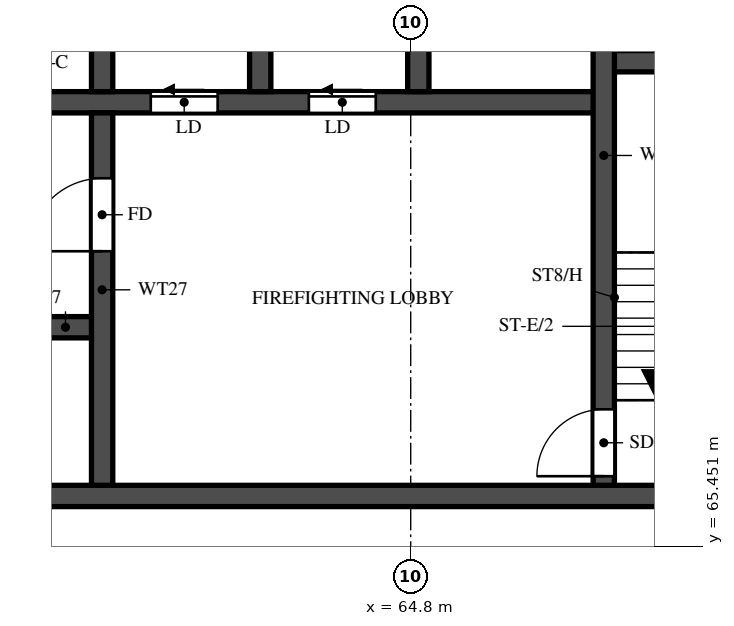
"""IFC4 building model, lengths in metres.
Left out: names, types, materials, properties, quantities, classifications, styles, units other than length and angle.
Written with IfcOpenShell. Run it as: python <this file> out.ifc"""

import sys

from ifc_helpers import new_model, si_unit, direction, frame, frame_2d, origin, place, context, subcontext, project, spatial, rectangle, extrude, element, fill, save


model = new_model("IFC4")
c1 = context("Model", 3, precision=1e-05, world=origin(), true_north=direction((0.0, 1.0)))
c2 = subcontext(c1, "Body", "Model", "MODEL_VIEW")
j1 = project(units=[si_unit("LENGTHUNIT", "METRE"), si_unit("PLANEANGLEUNIT", "RADIAN")], contexts=[c1])
p1 = place(None, origin())
s1 = spatial("IfcSite", under=j1, at=p1, CompositionType="ELEMENT")
p2 = place(p1, origin())
s2 = spatial("IfcBuilding", under=s1, at=p2, CompositionType="ELEMENT")
p3 = place(p2, frame((0.0, 0.0, 178.0)))
s3 = spatial("IfcBuildingStorey", under=s2, at=p3, CompositionType="ELEMENT", Elevation=178.0)
p4 = place(p3, frame((29.7, 66.275, 0.0), z_axis=(0.0, 0.0, 1.0), x_axis=(1.0, 0.0, 0.0)))
e1 = element("IfcWall", 1, at=p4, inside=s3, PredefinedType="SHEAR", context=c2, shape_type="SweptSolid", body=[
    extrude(rectangle(XDim=41.4, YDim=0.35, at=frame_2d((20.7, 0.0))), origin(), (0.0, 0.0, 1.0), 3.2),
])
p5 = place(p4, frame((0.925, 0.0, 0.0)))
e2 = element("IfcOpeningElement", 2, at=p5, cuts=e1, PredefinedType="OPENING", context=c2, shape_type="SweptSolid", body=[
    extrude(rectangle(XDim=1.1, YDim=2.1, at=frame_2d((0.55, 1.05))), frame((0.0, 0.185, 0.0), z_axis=(0.0, -1.0, 0.0), x_axis=(1.0, 0.0, 0.0)), (0.0, 0.0, 1.0), 0.37),
])
p6 = place(p4, frame((3.712, 0.0, 0.0)))
e3 = element("IfcOpeningElement", 3, at=p6, cuts=e1, PredefinedType="OPENING", context=c2, shape_type="SweptSolid", body=[
    extrude(rectangle(XDim=1.8, YDim=2.1, at=frame_2d((0.9, 1.05))), frame((0.0, 0.185, 0.0), z_axis=(0.0, -1.0, 0.0), x_axis=(1.0, 0.0, 0.0)), (0.0, 0.0, 1.0), 0.37),
])
p7 = place(p3, frame((35.625, 69.05, 0.0), z_axis=(0.0, 0.0, 1.0), x_axis=(1.0, 0.0, 0.0)))
e4 = element("IfcWall", 4, at=p7, inside=s3, PredefinedType="SHEAR", context=c2, shape_type="SweptSolid", body=[
    extrude(rectangle(XDim=24.1, YDim=0.35, at=frame_2d((12.05, 0.0))), origin(), (0.0, 0.0, 1.0), 3.2),
])
p8 = place(p7, frame((1.0, 0.0, 0.0)))
e5 = element("IfcOpeningElement", 5, at=p8, cuts=e4, PredefinedType="OPENING", context=c2, shape_type="SweptSolid", body=[
    extrude(rectangle(XDim=1.1, YDim=2.1, at=frame_2d((0.55, 1.05))), frame((0.0, 0.185, 0.0), z_axis=(0.0, -1.0, 0.0), x_axis=(1.0, 0.0, 0.0)), (0.0, 0.0, 1.0), 0.37),
])
p9 = place(p7, frame((3.75, 0.0, 0.0)))
e6 = element("IfcOpeningElement", 6, at=p9, cuts=e4, PredefinedType="OPENING", context=c2, shape_type="SweptSolid", body=[
    extrude(rectangle(XDim=1.1, YDim=2.1, at=frame_2d((0.55, 1.05))), frame((0.0, 0.185, 0.0), z_axis=(0.0, -1.0, 0.0), x_axis=(1.0, 0.0, 0.0)), (0.0, 0.0, 1.0), 0.37),
])
p10 = place(p7, frame((6.5, 0.0, 0.0)))
e7 = element("IfcOpeningElement", 7, at=p10, cuts=e4, PredefinedType="OPENING", context=c2, shape_type="SweptSolid", body=[
    extrude(rectangle(XDim=1.1, YDim=2.1, at=frame_2d((0.55, 1.05))), frame((0.0, 0.185, 0.0), z_axis=(0.0, -1.0, 0.0), x_axis=(1.0, 0.0, 0.0)), (0.0, 0.0, 1.0), 0.37),
])
p11 = place(p7, frame((9.25, 0.0, 0.0)))
e8 = element("IfcOpeningElement", 8, at=p11, cuts=e4, PredefinedType="OPENING", context=c2, shape_type="SweptSolid", body=[
    extrude(rectangle(XDim=1.1, YDim=2.1, at=frame_2d((0.55, 1.05))), frame((0.0, 0.185, 0.0), z_axis=(0.0, -1.0, 0.0), x_axis=(1.0, 0.0, 0.0)), (0.0, 0.0, 1.0), 0.37),
])
p12 = place(p7, frame((12.0, 0.0, 0.0)))
e9 = element("IfcOpeningElement", 9, at=p12, cuts=e4, PredefinedType="OPENING", context=c2, shape_type="SweptSolid", body=[
    extrude(rectangle(XDim=1.1, YDim=2.1, at=frame_2d((0.55, 1.05))), frame((0.0, 0.185, 0.0), z_axis=(0.0, -1.0, 0.0), x_axis=(1.0, 0.0, 0.0)), (0.0, 0.0, 1.0), 0.37),
])
p13 = place(p7, frame((14.75, 0.0, 0.0)))
e10 = element("IfcOpeningElement", 10, at=p13, cuts=e4, PredefinedType="OPENING", context=c2, shape_type="SweptSolid", body=[
    extrude(rectangle(XDim=1.1, YDim=2.1, at=frame_2d((0.55, 1.05))), frame((0.0, 0.185, 0.0), z_axis=(0.0, -1.0, 0.0), x_axis=(1.0, 0.0, 0.0)), (0.0, 0.0, 1.0), 0.37),
])
p14 = place(p7, frame((17.625, 0.0, 0.0)))
e11 = element("IfcOpeningElement", 11, at=p14, cuts=e4, PredefinedType="OPENING", context=c2, shape_type="SweptSolid", body=[
    extrude(rectangle(XDim=1.1, YDim=2.1, at=frame_2d((0.55, 1.05))), frame((0.0, 0.185, 0.0), z_axis=(0.0, -1.0, 0.0), x_axis=(1.0, 0.0, 0.0)), (0.0, 0.0, 1.0), 0.37),
])
p15 = place(p7, frame((20.625, 0.0, 0.0)))
e12 = element("IfcOpeningElement", 12, at=p15, cuts=e4, PredefinedType="OPENING", context=c2, shape_type="SweptSolid", body=[
    extrude(rectangle(XDim=1.1, YDim=2.1, at=frame_2d((0.55, 1.05))), frame((0.0, 0.185, 0.0), z_axis=(0.0, -1.0, 0.0), x_axis=(1.0, 0.0, 0.0)), (0.0, 0.0, 1.0), 0.37),
])
p16 = place(p3, frame((32.825, 72.75, 0.0), z_axis=(0.0, 0.0, 1.0), x_axis=(1.0, 0.0, 0.0)))
e13 = element("IfcWall", 13, at=p16, inside=s3, PredefinedType="SHEAR", context=c2, shape_type="SweptSolid", body=[
    extrude(rectangle(XDim=35.15, YDim=0.35, at=frame_2d((17.575, 0.0))), origin(), (0.0, 0.0, 1.0), 3.2),
])
p17 = place(p16, frame((19.8, 0.0, 0.0)))
e14 = element("IfcOpeningElement", 14, at=p17, cuts=e13, PredefinedType="OPENING", context=c2, shape_type="SweptSolid", body=[
    extrude(rectangle(XDim=1.1, YDim=2.1, at=frame_2d((0.55, 1.05))), frame((0.0, 0.185, 0.0), z_axis=(0.0, -1.0, 0.0), x_axis=(1.0, 0.0, 0.0)), (0.0, 0.0, 1.0), 0.37),
])
p18 = place(p16, frame((27.7, 0.0, 0.0)))
e15 = element("IfcOpeningElement", 15, at=p18, cuts=e13, PredefinedType="OPENING", context=c2, shape_type="SweptSolid", body=[
    extrude(rectangle(XDim=1.1, YDim=2.1, at=frame_2d((0.55, 1.05))), frame((0.0, 0.185, 0.0), z_axis=(0.0, -1.0, 0.0), x_axis=(1.0, 0.0, 0.0)), (0.0, 0.0, 1.0), 0.37),
])
p19 = place(p16, frame((30.3, 0.0, 0.0)))
e16 = element("IfcOpeningElement", 16, at=p19, cuts=e13, PredefinedType="OPENING", context=c2, shape_type="SweptSolid", body=[
    extrude(rectangle(XDim=1.1, YDim=2.1, at=frame_2d((0.55, 1.05))), frame((0.0, 0.185, 0.0), z_axis=(0.0, -1.0, 0.0), x_axis=(1.0, 0.0, 0.0)), (0.0, 0.0, 1.0), 0.37),
])
p20 = place(p16, frame((3.8, 0.0, 0.0)))
e17 = element("IfcOpeningElement", 17, at=p20, cuts=e13, PredefinedType="OPENING", context=c2, shape_type="SweptSolid", body=[
    extrude(rectangle(XDim=1.1, YDim=2.1, at=frame_2d((0.55, 1.05))), frame((0.0, 0.185, 0.0), z_axis=(0.0, -1.0, 0.0), x_axis=(1.0, 0.0, 0.0)), (0.0, 0.0, 1.0), 0.37),
])
p21 = place(p16, frame((6.55, 0.0, 0.0)))
e18 = element("IfcOpeningElement", 18, at=p21, cuts=e13, PredefinedType="OPENING", context=c2, shape_type="SweptSolid", body=[
    extrude(rectangle(XDim=1.1, YDim=2.1, at=frame_2d((0.55, 1.05))), frame((0.0, 0.185, 0.0), z_axis=(0.0, -1.0, 0.0), x_axis=(1.0, 0.0, 0.0)), (0.0, 0.0, 1.0), 0.37),
])
p22 = place(p16, frame((9.3, 0.0, 0.0)))
e19 = element("IfcOpeningElement", 19, at=p22, cuts=e13, PredefinedType="OPENING", context=c2, shape_type="SweptSolid", body=[
    extrude(rectangle(XDim=1.1, YDim=2.1, at=frame_2d((0.55, 1.05))), frame((0.0, 0.185, 0.0), z_axis=(0.0, -1.0, 0.0), x_axis=(1.0, 0.0, 0.0)), (0.0, 0.0, 1.0), 0.37),
])
p23 = place(p16, frame((12.05, 0.0, 0.0)))
e20 = element("IfcOpeningElement", 20, at=p23, cuts=e13, PredefinedType="OPENING", context=c2, shape_type="SweptSolid", body=[
    extrude(rectangle(XDim=1.1, YDim=2.1, at=frame_2d((0.55, 1.05))), frame((0.0, 0.185, 0.0), z_axis=(0.0, -1.0, 0.0), x_axis=(1.0, 0.0, 0.0)), (0.0, 0.0, 1.0), 0.37),
])
p24 = place(p16, frame((14.8, 0.0, 0.0)))
e21 = element("IfcOpeningElement", 21, at=p24, cuts=e13, PredefinedType="OPENING", context=c2, shape_type="SweptSolid", body=[
    extrude(rectangle(XDim=1.1, YDim=2.1, at=frame_2d((0.55, 1.05))), frame((0.0, 0.185, 0.0), z_axis=(0.0, -1.0, 0.0), x_axis=(1.0, 0.0, 0.0)), (0.0, 0.0, 1.0), 0.37),
])
p25 = place(p16, frame((17.55, 0.0, 0.0)))
e22 = element("IfcOpeningElement", 22, at=p25, cuts=e13, PredefinedType="OPENING", context=c2, shape_type="SweptSolid", body=[
    extrude(rectangle(XDim=1.1, YDim=2.1, at=frame_2d((0.55, 1.05))), frame((0.0, 0.185, 0.0), z_axis=(0.0, -1.0, 0.0), x_axis=(1.0, 0.0, 0.0)), (0.0, 0.0, 1.0), 0.37),
])
p26 = place(p16, frame((0.938, 0.0, 0.0)))
e23 = element("IfcOpeningElement", 23, at=p26, cuts=e13, PredefinedType="OPENING", context=c2, shape_type="SweptSolid", body=[
    extrude(rectangle(XDim=1.1, YDim=2.1, at=frame_2d((0.55, 1.05))), frame((0.0, 0.185, 0.0), z_axis=(0.0, -1.0, 0.0), x_axis=(1.0, 0.0, 0.0)), (0.0, 0.0, 1.0), 0.37),
])
p27 = place(p3, frame((67.975, 73.425, 0.0), z_axis=(0.0, 0.0, 1.0), x_axis=(1.0, 0.0, 0.0)))
e24 = element("IfcWall", 24, at=p27, inside=s3, PredefinedType="SHEAR", context=c2, shape_type="SweptSolid", body=[
    extrude(rectangle(XDim=3.125, YDim=0.35, at=frame_2d((1.562, 0.0))), origin(), (0.0, 0.0, 1.0), 3.2),
])
p28 = place(p3, frame((67.975, 66.45, 0.0), z_axis=(0.0, 0.0, 1.0), x_axis=(0.0, 1.0, 0.0)))
e25 = element("IfcWall", 25, at=p28, inside=s3, PredefinedType="SHEAR", context=c2, shape_type="SweptSolid", body=[
    extrude(rectangle(XDim=10.85, YDim=0.35, at=frame_2d((5.425, 0.0))), origin(), (0.0, 0.0, 1.0), 3.2),
])
p29 = place(p28, frame((0.15, 0.0, 0.0)))
e26 = element("IfcOpeningElement", 26, at=p29, cuts=e25, PredefinedType="OPENING", context=c2, shape_type="SweptSolid", body=[
    extrude(rectangle(XDim=1.1, YDim=2.1, at=frame_2d((0.55, 1.05))), frame((0.0, 0.185, 0.0), z_axis=(0.0, -1.0, 0.0), x_axis=(1.0, 0.0, 0.0)), (0.0, 0.0, 1.0), 0.37),
])
p30 = place(p3, frame((59.725, 66.45, 0.0), z_axis=(0.0, 0.0, 1.0), x_axis=(0.0, 1.0, 0.0)))
e27 = element("IfcWall", 27, at=p30, inside=s3, PredefinedType="SHEAR", context=c2, shape_type="SweptSolid", body=[
    extrude(rectangle(XDim=6.125, YDim=0.35, at=frame_2d((3.062, 0.0))), origin(), (0.0, 0.0, 1.0), 3.2),
])
p31 = place(p30, frame((3.85, 0.0, 0.0)))
e28 = element("IfcOpeningElement", 28, at=p31, cuts=e27, PredefinedType="OPENING", context=c2, shape_type="SweptSolid", body=[
    extrude(rectangle(XDim=1.2, YDim=2.1, at=frame_2d((0.6, 1.05))), frame((0.0, 0.185, 0.0), z_axis=(0.0, -1.0, 0.0), x_axis=(1.0, 0.0, 0.0)), (0.0, 0.0, 1.0), 0.37),
])
for number, where, z_axis, x_axis in (
    (29, (59.725, 72.925, 0.0), (0.0, 0.0, 1.0), (0.0, 1.0, 0.0)),
    (30, (62.325, 72.925, 0.0), (0.0, 0.0, 1.0), (0.0, 1.0, 0.0)),
    (31, (64.925, 72.925, 0.0), (0.0, 0.0, 1.0), (0.0, 1.0, 0.0)),
):
    element("IfcWall", number, at=place(p3, frame(where, z_axis=z_axis, x_axis=x_axis)), inside=s3, PredefinedType="SHEAR", context=c2, shape_type="SweptSolid", body=[
        extrude(rectangle(XDim=2.95, YDim=0.35, at=frame_2d((1.475, 0.0))), origin(), (0.0, 0.0, 1.0), 3.2),
    ])
p32 = place(p29, origin())
e32 = element("IfcDoor", 32, at=p32, inside=s3, OperationType="SINGLE_SWING_LEFT", PredefinedType="DOOR", context=c2, shape_type="SweptSolid", body=[
    extrude(rectangle(XDim=1.1, YDim=2.1, at=frame_2d((0.55, 1.05))), frame((0.0, 0.025, 0.0), z_axis=(0.0, -1.0, 0.0), x_axis=(1.0, 0.0, 0.0)), (0.0, 0.0, 1.0), 0.05),
])
fill(e26, e32)
p33 = place(p31, origin())
e33 = element("IfcDoor", 33, at=p33, inside=s3, OperationType="SINGLE_SWING_LEFT", PredefinedType="DOOR", context=c2, shape_type="SweptSolid", body=[
    extrude(rectangle(XDim=1.2, YDim=2.1, at=frame_2d((0.6, 1.05))), frame((0.0, 0.025, 0.0), z_axis=(0.0, -1.0, 0.0), x_axis=(1.0, 0.0, 0.0)), (0.0, 0.0, 1.0), 0.05),
])
fill(e28, e33)
p34 = place(p18, origin())
e34 = element("IfcDoor", 34, at=p34, inside=s3, OperationType="SLIDING_TO_LEFT", PredefinedType="DOOR", context=c2, shape_type="SweptSolid", body=[
    extrude(rectangle(XDim=1.1, YDim=2.1, at=frame_2d((0.55, 1.05))), frame((0.0, 0.025, 0.0), z_axis=(0.0, -1.0, 0.0), x_axis=(1.0, 0.0, 0.0)), (0.0, 0.0, 1.0), 0.05),
])
fill(e15, e34)
p35 = place(p19, origin())
e35 = element("IfcDoor", 35, at=p35, inside=s3, OperationType="SLIDING_TO_LEFT", PredefinedType="DOOR", context=c2, shape_type="SweptSolid", body=[
    extrude(rectangle(XDim=1.1, YDim=2.1, at=frame_2d((0.55, 1.05))), frame((0.0, 0.025, 0.0), z_axis=(0.0, -1.0, 0.0), x_axis=(1.0, 0.0, 0.0)), (0.0, 0.0, 1.0), 0.05),
])
fill(e16, e35)
save(model, sys.argv[1])
